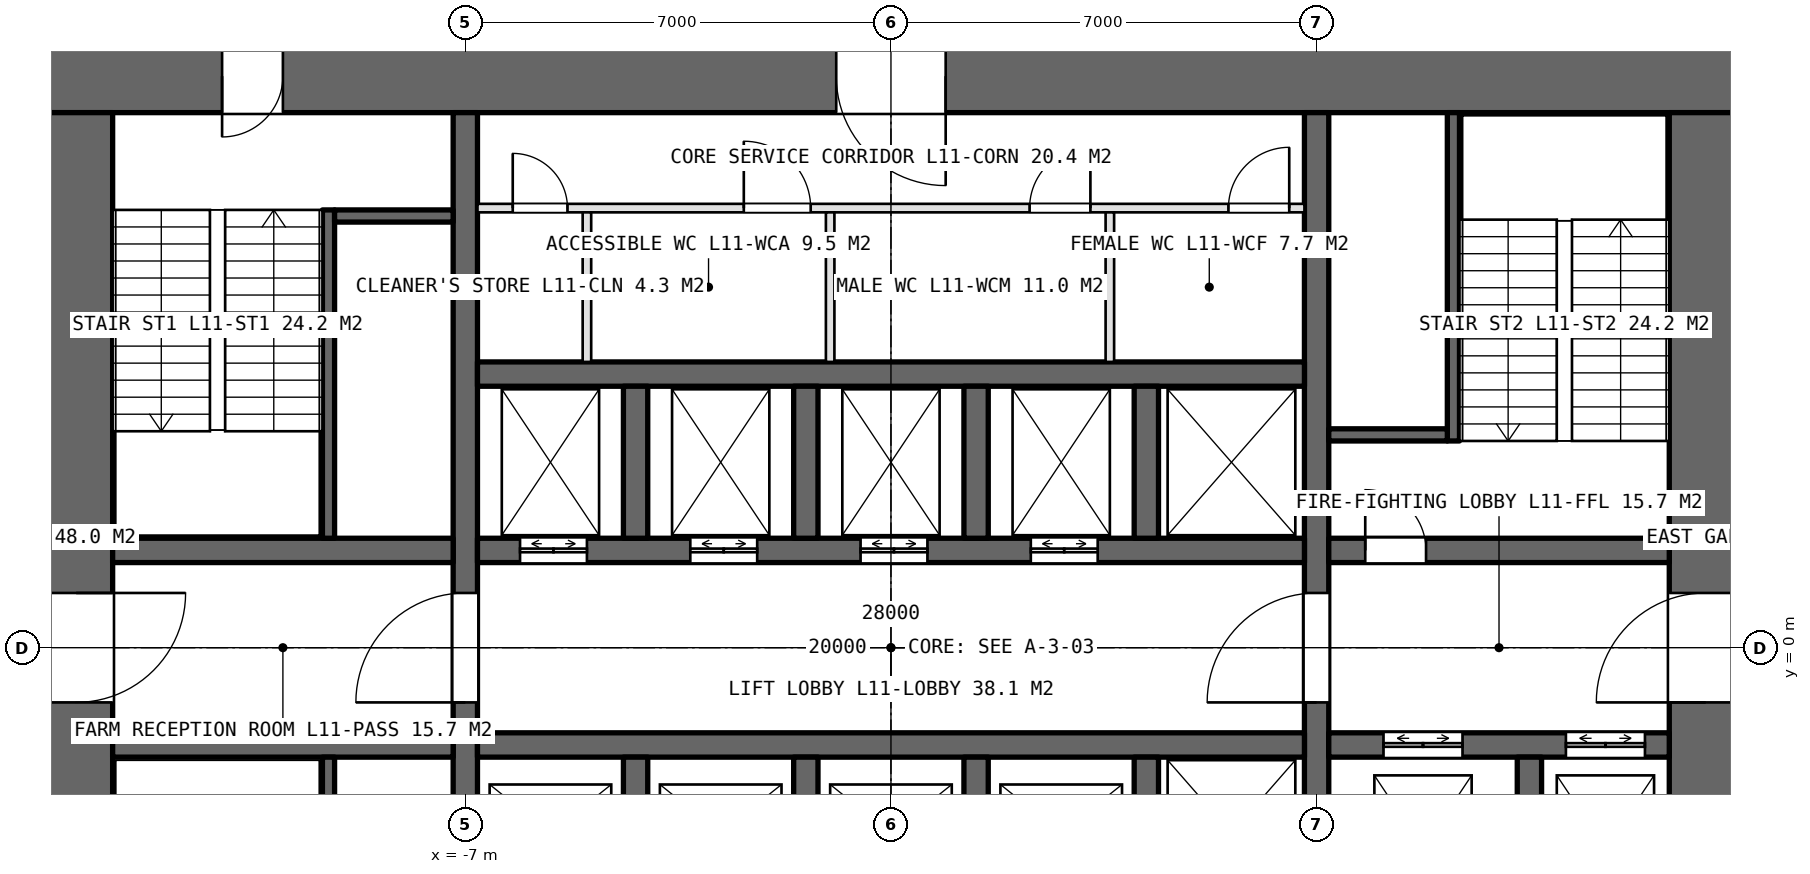
"""IFC4 building model, lengths in metres.
Left out: names, types, materials, properties, quantities, classifications, styles, units other than length and angle.
Written with IfcOpenShell. Run it as: python <this file> out.ifc"""

import sys

from ifc_helpers import new_model, si_unit, direction, frame, frame_2d, origin, place, context, subcontext, project, spatial, rectangle, extrude, element, fill, save


model = new_model("IFC4")
c1 = context("Model", 3, precision=1e-05, world=origin(), true_north=direction((0.0, 1.0)))
c2 = subcontext(c1, "Body", "Model", "MODEL_VIEW")
j1 = project(units=[si_unit("LENGTHUNIT", "METRE"), si_unit("PLANEANGLEUNIT", "RADIAN")], contexts=[c1])
p1 = place(None, origin())
s1 = spatial("IfcSite", under=j1, at=p1, CompositionType="ELEMENT")
p2 = place(p1, origin())
s2 = spatial("IfcBuilding", under=s1, at=p2, CompositionType="ELEMENT")
p3 = place(p2, frame((0.0, 0.0, 55.0)))
s3 = spatial("IfcBuildingStorey", under=s2, at=p3, CompositionType="ELEMENT", Elevation=55.0)
p4 = place(p3, frame((14.0, 9.4, 0.0), z_axis=(0.0, 0.0, 1.0), x_axis=(-1.0, 0.0, 0.0)))
e1 = element("IfcWall", 1, at=p4, inside=s3, PredefinedType="SHEAR", context=c2, shape_type="SweptSolid", body=[
    extrude(rectangle(XDim=28.0, YDim=1.2, at=frame_2d((14.0, 0.0))), origin(), (0.0, 0.0, 1.0), 5.0),
])
p5 = place(p4, frame((24.0, 0.0, 0.0)))
e2 = element("IfcOpeningElement", 2, at=p5, cuts=e1, PredefinedType="OPENING", context=c2, shape_type="SweptSolid", body=[
    extrude(rectangle(XDim=1.0, YDim=2.4, at=frame_2d((0.5, 1.2))), frame((0.0, 0.61, 0.0), z_axis=(0.0, -1.0, 0.0), x_axis=(1.0, 0.0, 0.0)), (0.0, 0.0, 1.0), 1.22),
])
p6 = place(p4, frame((13.1, 0.0, 0.0)))
e3 = element("IfcOpeningElement", 3, at=p6, cuts=e1, PredefinedType="OPENING", context=c2, shape_type="SweptSolid", body=[
    extrude(rectangle(XDim=1.8, YDim=2.4, at=frame_2d((0.9, 1.2))), frame((0.0, 0.61, 0.0), z_axis=(0.0, -1.0, 0.0), x_axis=(1.0, 0.0, 0.0)), (0.0, 0.0, 1.0), 1.22),
])
p7 = place(p3, frame((-13.4, 8.8, 0.0), z_axis=(0.0, 0.0, 1.0), x_axis=(0.0, -1.0, 0.0)))
e4 = element("IfcWall", 4, at=p7, inside=s3, PredefinedType="SHEAR", context=c2, shape_type="SweptSolid", body=[
    extrude(rectangle(XDim=17.6, YDim=1.2, at=frame_2d((8.8, 0.0))), origin(), (0.0, 0.0, 1.0), 5.0),
])
p8 = place(p7, frame((7.9, 0.0, 0.0)))
e5 = element("IfcOpeningElement", 5, at=p8, cuts=e4, PredefinedType="OPENING", context=c2, shape_type="SweptSolid", body=[
    extrude(rectangle(XDim=1.8, YDim=2.4, at=frame_2d((0.9, 1.2))), frame((0.0, 0.61, 0.0), z_axis=(0.0, -1.0, 0.0), x_axis=(1.0, 0.0, 0.0)), (0.0, 0.0, 1.0), 1.22),
])
p9 = place(p7, frame((16.5, 0.0, 0.0)))
e6 = element("IfcOpeningElement", 6, at=p9, cuts=e4, PredefinedType="OPENING", context=c2, shape_type="SweptSolid", body=[
    extrude(rectangle(XDim=1.0, YDim=2.4, at=frame_2d((0.5, 1.2))), frame((0.0, 0.61, 0.0), z_axis=(0.0, -1.0, 0.0), x_axis=(1.0, 0.0, 0.0)), (0.0, 0.0, 1.0), 1.22),
])
p10 = place(p3, frame((13.4, -8.8, 0.0), z_axis=(0.0, 0.0, 1.0), x_axis=(0.0, 1.0, 0.0)))
e7 = element("IfcWall", 7, at=p10, inside=s3, PredefinedType="SHEAR", context=c2, shape_type="SweptSolid", body=[
    extrude(rectangle(XDim=17.6, YDim=1.2, at=frame_2d((8.8, 0.0))), origin(), (0.0, 0.0, 1.0), 5.0),
])
p11 = place(p10, frame((7.9, 0.0, 0.0)))
e8 = element("IfcOpeningElement", 8, at=p11, cuts=e7, PredefinedType="OPENING", context=c2, shape_type="SweptSolid", body=[
    extrude(rectangle(XDim=1.8, YDim=2.4, at=frame_2d((0.9, 1.2))), frame((0.0, 0.61, 0.0), z_axis=(0.0, -1.0, 0.0), x_axis=(1.0, 0.0, 0.0)), (0.0, 0.0, 1.0), 1.22),
])
p12 = place(p3, frame((-7.0, -8.8, 0.0), z_axis=(0.0, 0.0, 1.0), x_axis=(0.0, 1.0, 0.0)))
e9 = element("IfcWall", 9, at=p12, inside=s3, PredefinedType="SHEAR", context=c2, shape_type="SweptSolid", body=[
    extrude(rectangle(XDim=17.6, YDim=0.4, at=frame_2d((8.8, 0.0))), origin(), (0.0, 0.0, 1.0), 5.0),
])
p13 = place(p12, frame((7.9, 0.0, 0.0)))
e10 = element("IfcOpeningElement", 10, at=p13, cuts=e9, PredefinedType="OPENING", context=c2, shape_type="SweptSolid", body=[
    extrude(rectangle(XDim=1.8, YDim=2.4, at=frame_2d((0.9, 1.2))), frame((0.0, 0.21, 0.0), z_axis=(0.0, -1.0, 0.0), x_axis=(1.0, 0.0, 0.0)), (0.0, 0.0, 1.0), 0.42),
])
p14 = place(p3, frame((7.0, -8.8, 0.0), z_axis=(0.0, 0.0, 1.0), x_axis=(0.0, 1.0, 0.0)))
e11 = element("IfcWall", 11, at=p14, inside=s3, PredefinedType="SHEAR", context=c2, shape_type="SweptSolid", body=[
    extrude(rectangle(XDim=17.6, YDim=0.4, at=frame_2d((8.8, 0.0))), origin(), (0.0, 0.0, 1.0), 5.0),
])
p15 = place(p14, frame((7.9, 0.0, 0.0)))
e12 = element("IfcOpeningElement", 12, at=p15, cuts=e11, PredefinedType="OPENING", context=c2, shape_type="SweptSolid", body=[
    extrude(rectangle(XDim=1.8, YDim=2.4, at=frame_2d((0.9, 1.2))), frame((0.0, 0.21, 0.0), z_axis=(0.0, -1.0, 0.0), x_axis=(1.0, 0.0, 0.0)), (0.0, 0.0, 1.0), 0.42),
])
p16 = place(p3, frame((-6.8, 1.6, 0.0), z_axis=(0.0, 0.0, 1.0), x_axis=(1.0, 0.0, 0.0)))
e13 = element("IfcWall", 13, at=p16, inside=s3, PredefinedType="SHEAR", context=c2, shape_type="SweptSolid", body=[
    extrude(rectangle(XDim=13.6, YDim=0.4, at=frame_2d((6.8, 0.0))), origin(), (0.0, 0.0, 1.0), 5.0),
])
p17 = place(p16, frame((0.7, 0.0, 0.0)))
e14 = element("IfcOpeningElement", 14, at=p17, cuts=e13, PredefinedType="OPENING", context=c2, shape_type="SweptSolid", body=[
    extrude(rectangle(XDim=1.1, YDim=2.4, at=frame_2d((0.55, 1.2))), frame((0.0, 0.21, 0.0), z_axis=(0.0, -1.0, 0.0), x_axis=(1.0, 0.0, 0.0)), (0.0, 0.0, 1.0), 0.42),
])
p18 = place(p16, frame((3.5, 0.0, 0.0)))
e15 = element("IfcOpeningElement", 15, at=p18, cuts=e13, PredefinedType="OPENING", context=c2, shape_type="SweptSolid", body=[
    extrude(rectangle(XDim=1.1, YDim=2.4, at=frame_2d((0.55, 1.2))), frame((0.0, 0.21, 0.0), z_axis=(0.0, -1.0, 0.0), x_axis=(1.0, 0.0, 0.0)), (0.0, 0.0, 1.0), 0.42),
])
p19 = place(p16, frame((6.3, 0.0, 0.0)))
e16 = element("IfcOpeningElement", 16, at=p19, cuts=e13, PredefinedType="OPENING", context=c2, shape_type="SweptSolid", body=[
    extrude(rectangle(XDim=1.1, YDim=2.4, at=frame_2d((0.55, 1.2))), frame((0.0, 0.21, 0.0), z_axis=(0.0, -1.0, 0.0), x_axis=(1.0, 0.0, 0.0)), (0.0, 0.0, 1.0), 0.42),
])
p20 = place(p16, frame((9.1, 0.0, 0.0)))
e17 = element("IfcOpeningElement", 17, at=p20, cuts=e13, PredefinedType="OPENING", context=c2, shape_type="SweptSolid", body=[
    extrude(rectangle(XDim=1.1, YDim=2.4, at=frame_2d((0.55, 1.2))), frame((0.0, 0.21, 0.0), z_axis=(0.0, -1.0, 0.0), x_axis=(1.0, 0.0, 0.0)), (0.0, 0.0, 1.0), 0.42),
])
for number, where, z_axis, x_axis in (
    (18, (-6.8, -1.6, 0.0), (0.0, 0.0, 1.0), (1.0, 0.0, 0.0)),
    (19, (-6.8, 4.5, 0.0), (0.0, 0.0, 1.0), (1.0, 0.0, 0.0)),
):
    element("IfcWall", number, at=place(p3, frame(where, z_axis=z_axis, x_axis=x_axis)), inside=s3, PredefinedType="SHEAR", context=c2, shape_type="SweptSolid", body=[
        extrude(rectangle(XDim=13.6, YDim=0.4, at=frame_2d((6.8, 0.0))), origin(), (0.0, 0.0, 1.0), 5.0),
    ])
for number, where, z_axis, x_axis in (
    (20, (-12.8, 1.6, 0.0), (0.0, 0.0, 1.0), (1.0, 0.0, 0.0)),
    (21, (-12.8, -1.6, 0.0), (0.0, 0.0, 1.0), (1.0, 0.0, 0.0)),
):
    element("IfcWall", number, at=place(p3, frame(where, z_axis=z_axis, x_axis=x_axis)), inside=s3, PredefinedType="SHEAR", context=c2, shape_type="SweptSolid", body=[
        extrude(rectangle(XDim=5.6, YDim=0.4, at=frame_2d((2.8, 0.0))), origin(), (0.0, 0.0, 1.0), 5.0),
    ])
p21 = place(p3, frame((7.2, 1.6, 0.0), z_axis=(0.0, 0.0, 1.0), x_axis=(1.0, 0.0, 0.0)))
e22 = element("IfcWall", 22, at=p21, inside=s3, PredefinedType="SHEAR", context=c2, shape_type="SweptSolid", body=[
    extrude(rectangle(XDim=5.6, YDim=0.4, at=frame_2d((2.8, 0.0))), origin(), (0.0, 0.0, 1.0), 5.0),
])
p22 = place(p21, frame((0.6, 0.0, 0.0)))
e23 = element("IfcOpeningElement", 23, at=p22, cuts=e22, PredefinedType="OPENING", context=c2, shape_type="SweptSolid", body=[
    extrude(rectangle(XDim=1.0, YDim=2.4, at=frame_2d((0.5, 1.2))), frame((0.0, 0.21, 0.0), z_axis=(0.0, -1.0, 0.0), x_axis=(1.0, 0.0, 0.0)), (0.0, 0.0, 1.0), 0.42),
])
p23 = place(p3, frame((7.2, -1.6, 0.0), z_axis=(0.0, 0.0, 1.0), x_axis=(1.0, 0.0, 0.0)))
e24 = element("IfcWall", 24, at=p23, inside=s3, PredefinedType="SHEAR", context=c2, shape_type="SweptSolid", body=[
    extrude(rectangle(XDim=5.6, YDim=0.4, at=frame_2d((2.8, 0.0))), origin(), (0.0, 0.0, 1.0), 5.0),
])
p24 = place(p23, frame((0.9, 0.0, 0.0)))
e25 = element("IfcOpeningElement", 25, at=p24, cuts=e24, PredefinedType="OPENING", context=c2, shape_type="SweptSolid", body=[
    extrude(rectangle(XDim=1.3, YDim=2.4, at=frame_2d((0.65, 1.2))), frame((0.0, 0.21, 0.0), z_axis=(0.0, -1.0, 0.0), x_axis=(1.0, 0.0, 0.0)), (0.0, 0.0, 1.0), 0.42),
])
p25 = place(p23, frame((3.9, 0.0, 0.0)))
e26 = element("IfcOpeningElement", 26, at=p25, cuts=e24, PredefinedType="OPENING", context=c2, shape_type="SweptSolid", body=[
    extrude(rectangle(XDim=1.3, YDim=2.4, at=frame_2d((0.65, 1.2))), frame((0.0, 0.21, 0.0), z_axis=(0.0, -1.0, 0.0), x_axis=(1.0, 0.0, 0.0)), (0.0, 0.0, 1.0), 0.42),
])
p26 = place(p3, frame((10.5, -4.8, 0.0), z_axis=(0.0, 0.0, 1.0), x_axis=(0.0, 1.0, 0.0)))
e27 = element("IfcWall", 27, at=p26, inside=s3, PredefinedType="SHEAR", context=c2, shape_type="SweptSolid", body=[
    extrude(rectangle(XDim=3.0, YDim=0.4, at=frame_2d((1.5, 0.0))), origin(), (0.0, 0.0, 1.0), 5.0),
])
for number, where, z_axis, x_axis in (
    (28, (-4.2, 1.8, 0.0), (0.0, 0.0, 1.0), (0.0, 1.0, 0.0)),
    (29, (-4.2, -4.3, 0.0), (0.0, 0.0, 1.0), (0.0, 1.0, 0.0)),
    (30, (-1.4, 1.8, 0.0), (0.0, 0.0, 1.0), (0.0, 1.0, 0.0)),
    (31, (-1.4, -4.3, 0.0), (0.0, 0.0, 1.0), (0.0, 1.0, 0.0)),
    (32, (1.4, 1.8, 0.0), (0.0, 0.0, 1.0), (0.0, 1.0, 0.0)),
    (33, (1.4, -4.3, 0.0), (0.0, 0.0, 1.0), (0.0, 1.0, 0.0)),
    (34, (4.2, 1.8, 0.0), (0.0, 0.0, 1.0), (0.0, 1.0, 0.0)),
    (35, (4.2, -4.3, 0.0), (0.0, 0.0, 1.0), (0.0, 1.0, 0.0)),
):
    element("IfcWall", number, at=place(p3, frame(where, z_axis=z_axis, x_axis=x_axis)), inside=s3, PredefinedType="SHEAR", context=c2, shape_type="SweptSolid", body=[
        extrude(rectangle(XDim=2.5, YDim=0.4, at=frame_2d((1.25, 0.0))), origin(), (0.0, 0.0, 1.0), 5.0),
    ])
p27 = place(p3, frame((-6.8, 7.23, 0.0), z_axis=(0.0, 0.0, 1.0), x_axis=(1.0, 0.0, 0.0)))
e36 = element("IfcWall", 36, at=p27, inside=s3, PredefinedType="PARTITIONING", context=c2, shape_type="SweptSolid", body=[
    extrude(rectangle(XDim=13.6, YDim=0.14, at=frame_2d((6.8, 0.0))), origin(), (0.0, 0.0, 1.0), 4.75),
])
p28 = place(p27, frame((0.58, 0.0, 0.0)))
e37 = element("IfcOpeningElement", 37, at=p28, cuts=e36, PredefinedType="OPENING", context=c2, shape_type="SweptSolid", body=[
    extrude(rectangle(XDim=0.9, YDim=2.4, at=frame_2d((0.45, 1.2))), frame((0.0, 0.08, 0.0), z_axis=(0.0, -1.0, 0.0), x_axis=(1.0, 0.0, 0.0)), (0.0, 0.0, 1.0), 0.16),
])
p29 = place(p27, frame((4.38, 0.0, 0.0)))
e38 = element("IfcOpeningElement", 38, at=p29, cuts=e36, PredefinedType="OPENING", context=c2, shape_type="SweptSolid", body=[
    extrude(rectangle(XDim=1.1, YDim=2.4, at=frame_2d((0.55, 1.2))), frame((0.0, 0.08, 0.0), z_axis=(0.0, -1.0, 0.0), x_axis=(1.0, 0.0, 0.0)), (0.0, 0.0, 1.0), 0.16),
])
p30 = place(p27, frame((9.08, 0.0, 0.0)))
e39 = element("IfcOpeningElement", 39, at=p30, cuts=e36, PredefinedType="OPENING", context=c2, shape_type="SweptSolid", body=[
    extrude(rectangle(XDim=1.0, YDim=2.4, at=frame_2d((0.5, 1.2))), frame((0.0, 0.08, 0.0), z_axis=(0.0, -1.0, 0.0), x_axis=(1.0, 0.0, 0.0)), (0.0, 0.0, 1.0), 0.16),
])
p31 = place(p27, frame((12.35, 0.0, 0.0)))
e40 = element("IfcOpeningElement", 40, at=p31, cuts=e36, PredefinedType="OPENING", context=c2, shape_type="SweptSolid", body=[
    extrude(rectangle(XDim=1.0, YDim=2.4, at=frame_2d((0.5, 1.2))), frame((0.0, 0.08, 0.0), z_axis=(0.0, -1.0, 0.0), x_axis=(1.0, 0.0, 0.0)), (0.0, 0.0, 1.0), 0.16),
])
for number, where, z_axis, x_axis in (
    (41, (-5.0, 4.7, 0.0), (0.0, 0.0, 1.0), (0.0, 1.0, 0.0)),
    (42, (-1.0, 4.7, 0.0), (0.0, 0.0, 1.0), (0.0, 1.0, 0.0)),
    (43, (3.6, 4.7, 0.0), (0.0, 0.0, 1.0), (0.0, 1.0, 0.0)),
):
    element("IfcWall", number, at=place(p3, frame(where, z_axis=z_axis, x_axis=x_axis)), inside=s3, PredefinedType="PARTITIONING", context=c2, shape_type="SweptSolid", body=[
        extrude(rectangle(XDim=2.46, YDim=0.14, at=frame_2d((1.23, 0.0))), origin(), (0.0, 0.0, 1.0), 4.75),
    ])
p32 = place(p3, frame((-9.25, 7.2, 0.0), z_axis=(0.0, 0.0, 1.0), x_axis=(0.0, -1.0, 0.0)))
e44 = element("IfcWall", 44, at=p32, inside=s3, PredefinedType="SOLIDWALL", context=c2, shape_type="SweptSolid", body=[
    extrude(rectangle(XDim=5.4, YDim=0.2, at=frame_2d((2.7, 0.0))), origin(), (0.0, 0.0, 1.0), 5.0),
])
p33 = place(p3, frame((-9.15, 7.1, 0.0), z_axis=(0.0, 0.0, 1.0), x_axis=(1.0, 0.0, 0.0)))
e45 = element("IfcWall", 45, at=p33, inside=s3, PredefinedType="SOLIDWALL", context=c2, shape_type="SweptSolid", body=[
    extrude(rectangle(XDim=1.95, YDim=0.2, at=frame_2d((0.975, 0.0))), origin(), (0.0, 0.0, 1.0), 5.0),
])
p34 = place(p3, frame((-9.25, -7.2, 0.0), z_axis=(0.0, 0.0, 1.0), x_axis=(0.0, 1.0, 0.0)))
e46 = element("IfcWall", 46, at=p34, inside=s3, PredefinedType="SOLIDWALL", context=c2, shape_type="SweptSolid", body=[
    extrude(rectangle(XDim=5.4, YDim=0.2, at=frame_2d((2.7, 0.0))), origin(), (0.0, 0.0, 1.0), 5.0),
])
p35 = place(p3, frame((9.25, 3.4, 0.0), z_axis=(0.0, 0.0, 1.0), x_axis=(0.0, 1.0, 0.0)))
e47 = element("IfcWall", 47, at=p35, inside=s3, PredefinedType="SOLIDWALL", context=c2, shape_type="SweptSolid", body=[
    extrude(rectangle(XDim=5.4, YDim=0.2, at=frame_2d((2.7, 0.0))), origin(), (0.0, 0.0, 1.0), 5.0),
])
p36 = place(p3, frame((9.15, 3.5, 0.0), z_axis=(0.0, 0.0, 1.0), x_axis=(-1.0, 0.0, 0.0)))
e48 = element("IfcWall", 48, at=p36, inside=s3, PredefinedType="SOLIDWALL", context=c2, shape_type="SweptSolid", body=[
    extrude(rectangle(XDim=1.95, YDim=0.2, at=frame_2d((0.975, 0.0))), origin(), (0.0, 0.0, 1.0), 5.0),
])
p37 = place(p8, origin())
e49 = element("IfcDoor", 49, at=p37, inside=s3, OperationType="DOUBLE_DOOR_SINGLE_SWING", PredefinedType="DOOR", context=c2, shape_type="SweptSolid", body=[
    extrude(rectangle(XDim=1.8, YDim=2.4, at=frame_2d((0.9, 1.2))), frame((0.0, 0.025, 0.0), z_axis=(0.0, -1.0, 0.0), x_axis=(1.0, 0.0, 0.0)), (0.0, 0.0, 1.0), 0.05),
])
fill(e5, e49)
p38 = place(p11, origin())
e50 = element("IfcDoor", 50, at=p38, inside=s3, OperationType="DOUBLE_DOOR_SINGLE_SWING", PredefinedType="DOOR", context=c2, shape_type="SweptSolid", body=[
    extrude(rectangle(XDim=1.8, YDim=2.4, at=frame_2d((0.9, 1.2))), frame((0.0, 0.025, 0.0), z_axis=(0.0, -1.0, 0.0), x_axis=(1.0, 0.0, 0.0)), (0.0, 0.0, 1.0), 0.05),
])
fill(e8, e50)
p39 = place(p13, origin())
e51 = element("IfcDoor", 51, at=p39, inside=s3, OperationType="DOUBLE_DOOR_SINGLE_SWING", PredefinedType="DOOR", context=c2, shape_type="SweptSolid", body=[
    extrude(rectangle(XDim=1.8, YDim=2.4, at=frame_2d((0.9, 1.2))), frame((0.0, 0.025, 0.0), z_axis=(0.0, -1.0, 0.0), x_axis=(1.0, 0.0, 0.0)), (0.0, 0.0, 1.0), 0.05),
])
fill(e10, e51)
p40 = place(p15, origin())
e52 = element("IfcDoor", 52, at=p40, inside=s3, OperationType="DOUBLE_DOOR_SINGLE_SWING", PredefinedType="DOOR", context=c2, shape_type="SweptSolid", body=[
    extrude(rectangle(XDim=1.8, YDim=2.4, at=frame_2d((0.9, 1.2))), frame((0.0, 0.025, 0.0), z_axis=(0.0, -1.0, 0.0), x_axis=(1.0, 0.0, 0.0)), (0.0, 0.0, 1.0), 0.05),
])
fill(e12, e52)
p41 = place(p5, origin())
e53 = element("IfcDoor", 53, at=p41, inside=s3, OperationType="SINGLE_SWING_RIGHT", PredefinedType="DOOR", context=c2, shape_type="SweptSolid", body=[
    extrude(rectangle(XDim=1.0, YDim=2.4, at=frame_2d((0.5, 1.2))), frame((0.0, 0.025, 0.0), z_axis=(0.0, -1.0, 0.0), x_axis=(1.0, 0.0, 0.0)), (0.0, 0.0, 1.0), 0.05),
])
fill(e2, e53)
p42 = place(p22, origin())
e54 = element("IfcDoor", 54, at=p42, inside=s3, OperationType="SINGLE_SWING_LEFT", PredefinedType="DOOR", context=c2, shape_type="SweptSolid", body=[
    extrude(rectangle(XDim=1.0, YDim=2.4, at=frame_2d((0.5, 1.2))), frame((0.0, 0.025, 0.0), z_axis=(0.0, -1.0, 0.0), x_axis=(1.0, 0.0, 0.0)), (0.0, 0.0, 1.0), 0.05),
])
fill(e23, e54)
p43 = place(p28, origin())
e55 = element("IfcDoor", 55, at=p43, inside=s3, OperationType="SINGLE_SWING_LEFT", PredefinedType="DOOR", context=c2, shape_type="SweptSolid", body=[
    extrude(rectangle(XDim=0.9, YDim=2.4, at=frame_2d((0.45, 1.2))), frame((0.0, 0.025, 0.0), z_axis=(0.0, -1.0, 0.0), x_axis=(1.0, 0.0, 0.0)), (0.0, 0.0, 1.0), 0.05),
])
fill(e37, e55)
p44 = place(p29, origin())
e56 = element("IfcDoor", 56, at=p44, inside=s3, OperationType="SINGLE_SWING_LEFT", PredefinedType="DOOR", context=c2, shape_type="SweptSolid", body=[
    extrude(rectangle(XDim=1.1, YDim=2.4, at=frame_2d((0.55, 1.2))), frame((0.0, 0.025, 0.0), z_axis=(0.0, -1.0, 0.0), x_axis=(1.0, 0.0, 0.0)), (0.0, 0.0, 1.0), 0.05),
])
fill(e38, e56)
p45 = place(p30, origin())
e57 = element("IfcDoor", 57, at=p45, inside=s3, OperationType="SINGLE_SWING_RIGHT", PredefinedType="DOOR", context=c2, shape_type="SweptSolid", body=[
    extrude(rectangle(XDim=1.0, YDim=2.4, at=frame_2d((0.5, 1.2))), frame((0.0, 0.025, 0.0), z_axis=(0.0, -1.0, 0.0), x_axis=(1.0, 0.0, 0.0)), (0.0, 0.0, 1.0), 0.05),
])
fill(e39, e57)
p46 = place(p31, origin())
e58 = element("IfcDoor", 58, at=p46, inside=s3, OperationType="SINGLE_SWING_RIGHT", PredefinedType="DOOR", context=c2, shape_type="SweptSolid", body=[
    extrude(rectangle(XDim=1.0, YDim=2.4, at=frame_2d((0.5, 1.2))), frame((0.0, 0.025, 0.0), z_axis=(0.0, -1.0, 0.0), x_axis=(1.0, 0.0, 0.0)), (0.0, 0.0, 1.0), 0.05),
])
fill(e40, e58)
p47 = place(p6, origin())
e59 = element("IfcDoor", 59, at=p47, inside=s3, OperationType="DOUBLE_DOOR_SINGLE_SWING", PredefinedType="DOOR", context=c2, shape_type="SweptSolid", body=[
    extrude(rectangle(XDim=1.8, YDim=2.4, at=frame_2d((0.9, 1.2))), frame((0.0, 0.025, 0.0), z_axis=(0.0, -1.0, 0.0), x_axis=(1.0, 0.0, 0.0)), (0.0, 0.0, 1.0), 0.05),
])
fill(e3, e59)
p48 = place(p17, origin())
e60 = element("IfcDoor", 60, at=p48, inside=s3, OperationType="DOUBLE_DOOR_SLIDING", PredefinedType="DOOR", context=c2, shape_type="SweptSolid", body=[
    extrude(rectangle(XDim=1.1, YDim=2.4, at=frame_2d((0.55, 1.2))), frame((0.0, 0.025, 0.0), z_axis=(0.0, -1.0, 0.0), x_axis=(1.0, 0.0, 0.0)), (0.0, 0.0, 1.0), 0.05),
])
fill(e14, e60)
p49 = place(p18, origin())
e61 = element("IfcDoor", 61, at=p49, inside=s3, OperationType="DOUBLE_DOOR_SLIDING", PredefinedType="DOOR", context=c2, shape_type="SweptSolid", body=[
    extrude(rectangle(XDim=1.1, YDim=2.4, at=frame_2d((0.55, 1.2))), frame((0.0, 0.025, 0.0), z_axis=(0.0, -1.0, 0.0), x_axis=(1.0, 0.0, 0.0)), (0.0, 0.0, 1.0), 0.05),
])
fill(e15, e61)
p50 = place(p19, origin())
e62 = element("IfcDoor", 62, at=p50, inside=s3, OperationType="DOUBLE_DOOR_SLIDING", PredefinedType="DOOR", context=c2, shape_type="SweptSolid", body=[
    extrude(rectangle(XDim=1.1, YDim=2.4, at=frame_2d((0.55, 1.2))), frame((0.0, 0.025, 0.0), z_axis=(0.0, -1.0, 0.0), x_axis=(1.0, 0.0, 0.0)), (0.0, 0.0, 1.0), 0.05),
])
fill(e16, e62)
p51 = place(p20, origin())
e63 = element("IfcDoor", 63, at=p51, inside=s3, OperationType="DOUBLE_DOOR_SLIDING", PredefinedType="DOOR", context=c2, shape_type="SweptSolid", body=[
    extrude(rectangle(XDim=1.1, YDim=2.4, at=frame_2d((0.55, 1.2))), frame((0.0, 0.025, 0.0), z_axis=(0.0, -1.0, 0.0), x_axis=(1.0, 0.0, 0.0)), (0.0, 0.0, 1.0), 0.05),
])
fill(e17, e63)
p52 = place(p24, origin())
e64 = element("IfcDoor", 64, at=p52, inside=s3, OperationType="DOUBLE_DOOR_SLIDING", PredefinedType="DOOR", context=c2, shape_type="SweptSolid", body=[
    extrude(rectangle(XDim=1.3, YDim=2.4, at=frame_2d((0.65, 1.2))), frame((0.0, 0.025, 0.0), z_axis=(0.0, -1.0, 0.0), x_axis=(1.0, 0.0, 0.0)), (0.0, 0.0, 1.0), 0.05),
])
fill(e25, e64)
p53 = place(p25, origin())
e65 = element("IfcDoor", 65, at=p53, inside=s3, OperationType="DOUBLE_DOOR_SLIDING", PredefinedType="DOOR", context=c2, shape_type="SweptSolid", body=[
    extrude(rectangle(XDim=1.3, YDim=2.4, at=frame_2d((0.65, 1.2))), frame((0.0, 0.025, 0.0), z_axis=(0.0, -1.0, 0.0), x_axis=(1.0, 0.0, 0.0)), (0.0, 0.0, 1.0), 0.05),
])
fill(e26, e65)
save(model, sys.argv[1])
